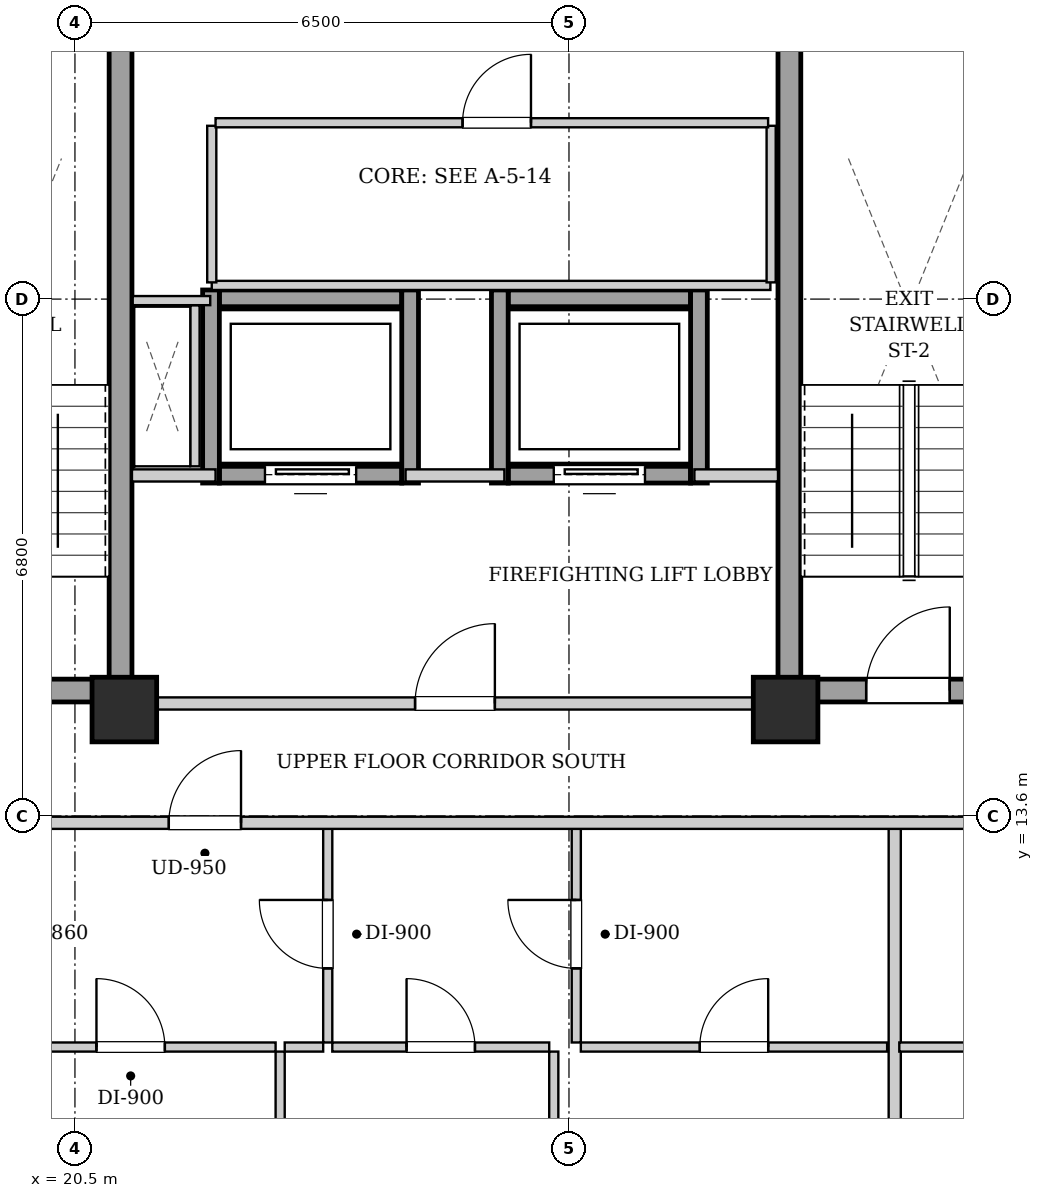
"""IFC4 building model, lengths in metres.
Left out: names, types, materials, properties, quantities, classifications, styles, units other than length and angle.
Written with IfcOpenShell. Run it as: python <this file> out.ifc"""

import sys

from ifc_helpers import new_model, si_unit, direction, frame, frame_2d, origin, origin_2d, place, context, subcontext, project, spatial, rectangle, extrude, element, fill, save


model = new_model("IFC4")
c1 = context("Model", 3, precision=1e-05, world=origin(), true_north=direction((0.0, 1.0)))
c2 = subcontext(c1, "Body", "Model", "MODEL_VIEW")
j1 = project(units=[si_unit("LENGTHUNIT", "METRE"), si_unit("PLANEANGLEUNIT", "RADIAN")], contexts=[c1])
p1 = place(None, origin())
s1 = spatial("IfcSite", under=j1, at=p1, CompositionType="ELEMENT")
p2 = place(p1, origin())
s2 = spatial("IfcBuilding", under=s1, at=p2, CompositionType="ELEMENT")
p3 = place(p2, frame((0.0, 0.0, 207.4)))
s3 = spatial("IfcBuildingStorey", under=s2, at=p3, CompositionType="ELEMENT", Elevation=207.4)
for number, where, z_axis, x_axis in (
    (1, (21.15, 15.0, 0.0), (0.0, 0.0, 1.0), (1.0, 0.0, 0.0)),
    (2, (29.85, 15.0, 0.0), (0.0, 0.0, 1.0), (1.0, 0.0, 0.0)),
):
    element("IfcColumn", number, at=place(p3, frame(where, z_axis=z_axis, x_axis=x_axis)), inside=s3, PredefinedType="COLUMN", context=c2, shape_type="SweptSolid", body=[
        extrude(rectangle(XDim=0.85, YDim=0.85, at=origin_2d()), origin(), (0.0, 0.0, 1.0), 3.3),
    ])
p4 = place(p3, frame((21.1, 15.1, 0.0), z_axis=(0.0, 0.0, 1.0), x_axis=(0.0, 1.0, 0.0)))
e3 = element("IfcWall", 3, at=p4, inside=s3, PredefinedType="SHEAR", context=c2, shape_type="SweptSolid", body=[
    extrude(rectangle(XDim=9.0, YDim=0.3, at=frame_2d((4.5, 0.0))), origin(), (0.0, 0.0, 1.0), 3.04),
])
p5 = place(p3, frame((18.1, 15.25, 0.0), z_axis=(0.0, 0.0, 1.0), x_axis=(1.0, 0.0, 0.0)))
e4 = element("IfcWall", 4, at=p5, inside=s3, PredefinedType="SHEAR", context=c2, shape_type="SweptSolid", body=[
    extrude(rectangle(XDim=2.85, YDim=0.3, at=frame_2d((1.425, 0.0))), origin(), (0.0, 0.0, 1.0), 3.04),
])
p6 = place(p5, frame((0.86, 0.0, 0.0)))
e5 = element("IfcOpeningElement", 5, at=p6, cuts=e4, PredefinedType="OPENING", context=c2, shape_type="SweptSolid", body=[
    extrude(rectangle(XDim=1.1, YDim=2.05, at=frame_2d((0.55, 1.025))), frame((0.0, 0.16, 0.0), z_axis=(0.0, -1.0, 0.0), x_axis=(1.0, 0.0, 0.0)), (0.0, 0.0, 1.0), 0.32),
])
p7 = place(p3, frame((29.9, 15.1, 0.0), z_axis=(0.0, 0.0, 1.0), x_axis=(0.0, 1.0, 0.0)))
e6 = element("IfcWall", 6, at=p7, inside=s3, PredefinedType="SHEAR", context=c2, shape_type="SweptSolid", body=[
    extrude(rectangle(XDim=9.0, YDim=0.3, at=frame_2d((4.5, 0.0))), origin(), (0.0, 0.0, 1.0), 3.04),
])
p8 = place(p3, frame((30.05, 15.25, 0.0), z_axis=(0.0, 0.0, 1.0), x_axis=(1.0, 0.0, 0.0)))
e7 = element("IfcWall", 7, at=p8, inside=s3, PredefinedType="SHEAR", context=c2, shape_type="SweptSolid", body=[
    extrude(rectangle(XDim=2.85, YDim=0.3, at=frame_2d((1.425, 0.0))), origin(), (0.0, 0.0, 1.0), 3.04),
])
p9 = place(p8, frame((0.86, 0.0, 0.0)))
e8 = element("IfcOpeningElement", 8, at=p9, cuts=e7, PredefinedType="OPENING", context=c2, shape_type="SweptSolid", body=[
    extrude(rectangle(XDim=1.1, YDim=2.05, at=frame_2d((0.55, 1.025))), frame((0.0, 0.16, 0.0), z_axis=(0.0, -1.0, 0.0), x_axis=(1.0, 0.0, 0.0)), (0.0, 0.0, 1.0), 0.32),
])
p10 = place(p3, frame((22.4, 18.09, 0.0), z_axis=(0.0, 0.0, 1.0), x_axis=(1.0, 0.0, 0.0)))
e9 = element("IfcWall", 9, at=p10, inside=s3, PredefinedType="SHEAR", context=c2, shape_type="SweptSolid", body=[
    extrude(rectangle(XDim=2.4, YDim=0.22, at=frame_2d((1.2, 0.0))), origin(), (0.0, 0.0, 1.0), 3.04),
])
p11 = place(p10, frame((0.6, 0.0, 0.0)))
e10 = element("IfcOpeningElement", 10, at=p11, cuts=e9, PredefinedType="OPENING", context=c2, shape_type="SweptSolid", body=[
    extrude(rectangle(XDim=1.2, YDim=2.15, at=frame_2d((0.6, 1.075))), frame((0.0, 0.12, 0.0), z_axis=(0.0, -1.0, 0.0), x_axis=(1.0, 0.0, 0.0)), (0.0, 0.0, 1.0), 0.24),
])
p12 = place(p3, frame((22.4, 20.41, 0.0), z_axis=(0.0, 0.0, 1.0), x_axis=(1.0, 0.0, 0.0)))
e11 = element("IfcWall", 11, at=p12, inside=s3, PredefinedType="SHEAR", context=c2, shape_type="SweptSolid", body=[
    extrude(rectangle(XDim=2.4, YDim=0.22, at=frame_2d((1.2, 0.0))), origin(), (0.0, 0.0, 1.0), 3.04),
])
for number, where, z_axis, x_axis in (
    (12, (22.29, 17.98, 0.0), (0.0, 0.0, 1.0), (0.0, 1.0, 0.0)),
    (13, (24.91, 17.98, 0.0), (0.0, 0.0, 1.0), (0.0, 1.0, 0.0)),
):
    element("IfcWall", number, at=place(p3, frame(where, z_axis=z_axis, x_axis=x_axis)), inside=s3, PredefinedType="SHEAR", context=c2, shape_type="SweptSolid", body=[
        extrude(rectangle(XDim=2.54, YDim=0.22, at=frame_2d((1.27, 0.0))), origin(), (0.0, 0.0, 1.0), 3.04),
    ])
p13 = place(p3, frame((26.2, 18.09, 0.0), z_axis=(0.0, 0.0, 1.0), x_axis=(1.0, 0.0, 0.0)))
e14 = element("IfcWall", 14, at=p13, inside=s3, PredefinedType="SHEAR", context=c2, shape_type="SweptSolid", body=[
    extrude(rectangle(XDim=2.4, YDim=0.22, at=frame_2d((1.2, 0.0))), origin(), (0.0, 0.0, 1.0), 3.04),
])
p14 = place(p13, frame((0.6, 0.0, 0.0)))
e15 = element("IfcOpeningElement", 15, at=p14, cuts=e14, PredefinedType="OPENING", context=c2, shape_type="SweptSolid", body=[
    extrude(rectangle(XDim=1.2, YDim=2.15, at=frame_2d((0.6, 1.075))), frame((0.0, 0.12, 0.0), z_axis=(0.0, -1.0, 0.0), x_axis=(1.0, 0.0, 0.0)), (0.0, 0.0, 1.0), 0.24),
])
p15 = place(p3, frame((26.2, 20.41, 0.0), z_axis=(0.0, 0.0, 1.0), x_axis=(1.0, 0.0, 0.0)))
e16 = element("IfcWall", 16, at=p15, inside=s3, PredefinedType="SHEAR", context=c2, shape_type="SweptSolid", body=[
    extrude(rectangle(XDim=2.4, YDim=0.22, at=frame_2d((1.2, 0.0))), origin(), (0.0, 0.0, 1.0), 3.04),
])
for number, where, z_axis, x_axis in (
    (17, (26.09, 17.98, 0.0), (0.0, 0.0, 1.0), (0.0, 1.0, 0.0)),
    (18, (28.71, 17.98, 0.0), (0.0, 0.0, 1.0), (0.0, 1.0, 0.0)),
):
    element("IfcWall", number, at=place(p3, frame(where, z_axis=z_axis, x_axis=x_axis)), inside=s3, PredefinedType="SHEAR", context=c2, shape_type="SweptSolid", body=[
        extrude(rectangle(XDim=2.54, YDim=0.22, at=frame_2d((1.27, 0.0))), origin(), (0.0, 0.0, 1.0), 3.04),
    ])
p16 = place(p3, frame((21.25, 15.08, 0.0), z_axis=(0.0, 0.0, 1.0), x_axis=(1.0, 0.0, 0.0)))
e19 = element("IfcWall", 19, at=p16, inside=s3, PredefinedType="PARTITIONING", context=c2, shape_type="SweptSolid", body=[
    extrude(rectangle(XDim=8.5, YDim=0.16, at=frame_2d((4.25, 0.0))), origin(), (0.0, 0.0, 1.0), 2.556),
])
p17 = place(p16, frame((3.725, 0.0, 0.0)))
e20 = element("IfcOpeningElement", 20, at=p17, cuts=e19, PredefinedType="OPENING", context=c2, shape_type="SweptSolid", body=[
    extrude(rectangle(XDim=1.05, YDim=2.05, at=frame_2d((0.525, 1.025))), frame((0.0, 0.09, 0.0), z_axis=(0.0, -1.0, 0.0), x_axis=(1.0, 0.0, 0.0)), (0.0, 0.0, 1.0), 0.18),
])
p18 = place(p3, frame((21.25, 18.08, 0.0), z_axis=(0.0, 0.0, 1.0), x_axis=(1.0, 0.0, 0.0)))
e21 = element("IfcWall", 21, at=p18, inside=s3, PredefinedType="PARTITIONING", context=c2, shape_type="SweptSolid", body=[
    extrude(rectangle(XDim=1.1, YDim=0.16, at=frame_2d((0.55, 0.0))), origin(), (0.0, 0.0, 1.0), 3.04),
])
p19 = place(p3, frame((24.85, 18.08, 0.0), z_axis=(0.0, 0.0, 1.0), x_axis=(1.0, 0.0, 0.0)))
e22 = element("IfcWall", 22, at=p19, inside=s3, PredefinedType="PARTITIONING", context=c2, shape_type="SweptSolid", body=[
    extrude(rectangle(XDim=1.3, YDim=0.16, at=frame_2d((0.65, 0.0))), origin(), (0.0, 0.0, 1.0), 3.04),
])
p20 = place(p3, frame((28.65, 18.08, 0.0), z_axis=(0.0, 0.0, 1.0), x_axis=(1.0, 0.0, 0.0)))
e23 = element("IfcWall", 23, at=p20, inside=s3, PredefinedType="PARTITIONING", context=c2, shape_type="SweptSolid", body=[
    extrude(rectangle(XDim=1.1, YDim=0.16, at=frame_2d((0.55, 0.0))), origin(), (0.0, 0.0, 1.0), 3.04),
])
p21 = place(p3, frame((22.08, 18.2, 0.0), z_axis=(0.0, 0.0, 1.0), x_axis=(0.0, 1.0, 0.0)))
e24 = element("IfcWall", 24, at=p21, inside=s3, PredefinedType="PARTITIONING", context=c2, shape_type="SweptSolid", body=[
    extrude(rectangle(XDim=2.12, YDim=0.12, at=frame_2d((1.06, 0.0))), origin(), (0.0, 0.0, 1.0), 3.04),
])
p22 = place(p3, frame((22.28, 20.38, 0.0), z_axis=(0.0, 0.0, 1.0), x_axis=(-1.0, 0.0, 0.0)))
e25 = element("IfcWall", 25, at=p22, inside=s3, PredefinedType="PARTITIONING", context=c2, shape_type="SweptSolid", body=[
    extrude(rectangle(XDim=1.02, YDim=0.12, at=frame_2d((0.51, 0.0))), origin(), (0.0, 0.0, 1.0), 3.04),
])
p23 = place(p3, frame((22.3, 20.58, 0.0), z_axis=(0.0, 0.0, 1.0), x_axis=(1.0, 0.0, 0.0)))
e26 = element("IfcWall", 26, at=p23, inside=s3, PredefinedType="PARTITIONING", context=c2, shape_type="SweptSolid", body=[
    extrude(rectangle(XDim=7.35, YDim=0.12, at=frame_2d((3.675, 0.0))), origin(), (0.0, 0.0, 1.0), 3.04),
])
for number, where, z_axis, x_axis in (
    (27, (22.3, 20.62, 0.0), (0.0, 0.0, 1.0), (0.0, 1.0, 0.0)),
    (28, (29.66, 20.62, 0.0), (0.0, 0.0, 1.0), (0.0, 1.0, 0.0)),
):
    element("IfcWall", number, at=place(p3, frame(where, z_axis=z_axis, x_axis=x_axis)), inside=s3, PredefinedType="PARTITIONING", context=c2, shape_type="SweptSolid", body=[
        extrude(rectangle(XDim=2.06, YDim=0.12, at=frame_2d((1.03, 0.0))), origin(), (0.0, 0.0, 1.0), 3.04),
    ])
p24 = place(p3, frame((22.35, 22.72, 0.0), z_axis=(0.0, 0.0, 1.0), x_axis=(1.0, 0.0, 0.0)))
e29 = element("IfcWall", 29, at=p24, inside=s3, PredefinedType="PARTITIONING", context=c2, shape_type="SweptSolid", body=[
    extrude(rectangle(XDim=7.27, YDim=0.12, at=frame_2d((3.635, 0.0))), origin(), (0.0, 0.0, 1.0), 3.04),
])
p25 = place(p24, frame((3.25, 0.0, 0.0)))
e30 = element("IfcOpeningElement", 30, at=p25, cuts=e29, PredefinedType="OPENING", context=c2, shape_type="SweptSolid", body=[
    extrude(rectangle(XDim=0.9, YDim=2.05, at=frame_2d((0.45, 1.025))), frame((0.0, 0.07, 0.0), z_axis=(0.0, -1.0, 0.0), x_axis=(1.0, 0.0, 0.0)), (0.0, 0.0, 1.0), 0.14),
])
p26 = place(p3, frame((23.826, 10.62, 0.0), z_axis=(0.0, 0.0, 1.0), x_axis=(0.0, 1.0, 0.0)))
e31 = element("IfcWall", 31, at=p26, inside=s3, PredefinedType="PARTITIONING", context=c2, shape_type="SweptSolid", body=[
    extrude(rectangle(XDim=2.85, YDim=0.12, at=frame_2d((1.425, 0.0))), origin(), (0.0, 0.0, 1.0), 3.04),
])
p27 = place(p26, frame((0.975, 0.0, 0.0)))
e32 = element("IfcOpeningElement", 32, at=p27, cuts=e31, PredefinedType="OPENING", context=c2, shape_type="SweptSolid", body=[
    extrude(rectangle(XDim=0.9, YDim=2.05, at=frame_2d((0.45, 1.025))), frame((0.0, 0.07, 0.0), z_axis=(0.0, -1.0, 0.0), x_axis=(1.0, 0.0, 0.0)), (0.0, 0.0, 1.0), 0.14),
])
p28 = place(p3, frame((19.326, 10.56, 0.0), z_axis=(0.0, 0.0, 1.0), x_axis=(1.0, 0.0, 0.0)))
e33 = element("IfcWall", 33, at=p28, inside=s3, PredefinedType="PARTITIONING", context=c2, shape_type="SweptSolid", body=[
    extrude(rectangle(XDim=3.814, YDim=0.12, at=frame_2d((1.907, 0.0))), origin(), (0.0, 0.0, 1.0), 3.04),
])
p29 = place(p28, frame((1.457, 0.0, 0.0)))
e34 = element("IfcOpeningElement", 34, at=p29, cuts=e33, PredefinedType="OPENING", context=c2, shape_type="SweptSolid", body=[
    extrude(rectangle(XDim=0.9, YDim=2.05, at=frame_2d((0.45, 1.025))), frame((0.0, 0.07, 0.0), z_axis=(0.0, -1.0, 0.0), x_axis=(1.0, 0.0, 0.0)), (0.0, 0.0, 1.0), 0.14),
])
p30 = place(p3, frame((23.26, 10.56, 0.0), z_axis=(0.0, 0.0, 1.0), x_axis=(1.0, 0.0, 0.0)))
e35 = element("IfcWall", 35, at=p30, inside=s3, PredefinedType="PARTITIONING", context=c2, shape_type="SweptSolid", body=[
    extrude(rectangle(XDim=0.506, YDim=0.12, at=frame_2d((0.253, 0.0))), origin(), (0.0, 0.0, 1.0), 3.04),
])
p31 = place(p3, frame((27.096, 10.62, 0.0), z_axis=(0.0, 0.0, 1.0), x_axis=(0.0, 1.0, 0.0)))
e36 = element("IfcWall", 36, at=p31, inside=s3, PredefinedType="PARTITIONING", context=c2, shape_type="SweptSolid", body=[
    extrude(rectangle(XDim=2.85, YDim=0.12, at=frame_2d((1.425, 0.0))), origin(), (0.0, 0.0, 1.0), 3.04),
])
p32 = place(p31, frame((0.975, 0.0, 0.0)))
e37 = element("IfcOpeningElement", 37, at=p32, cuts=e36, PredefinedType="OPENING", context=c2, shape_type="SweptSolid", body=[
    extrude(rectangle(XDim=0.9, YDim=2.05, at=frame_2d((0.45, 1.025))), frame((0.0, 0.07, 0.0), z_axis=(0.0, -1.0, 0.0), x_axis=(1.0, 0.0, 0.0)), (0.0, 0.0, 1.0), 0.14),
])
p33 = place(p3, frame((23.886, 10.56, 0.0), z_axis=(0.0, 0.0, 1.0), x_axis=(1.0, 0.0, 0.0)))
e38 = element("IfcWall", 38, at=p33, inside=s3, PredefinedType="PARTITIONING", context=c2, shape_type="SweptSolid", body=[
    extrude(rectangle(XDim=2.854, YDim=0.12, at=frame_2d((1.427, 0.0))), origin(), (0.0, 0.0, 1.0), 3.04),
])
p34 = place(p33, frame((0.977, 0.0, 0.0)))
e39 = element("IfcOpeningElement", 39, at=p34, cuts=e38, PredefinedType="OPENING", context=c2, shape_type="SweptSolid", body=[
    extrude(rectangle(XDim=0.9, YDim=2.05, at=frame_2d((0.45, 1.025))), frame((0.0, 0.07, 0.0), z_axis=(0.0, -1.0, 0.0), x_axis=(1.0, 0.0, 0.0)), (0.0, 0.0, 1.0), 0.14),
])
p35 = place(p3, frame((27.156, 10.56, 0.0), z_axis=(0.0, 0.0, 1.0), x_axis=(1.0, 0.0, 0.0)))
e40 = element("IfcWall", 40, at=p35, inside=s3, PredefinedType="PARTITIONING", context=c2, shape_type="SweptSolid", body=[
    extrude(rectangle(XDim=4.03, YDim=0.12, at=frame_2d((2.015, 0.0))), origin(), (0.0, 0.0, 1.0), 3.04),
])
p36 = place(p35, frame((1.565, 0.0, 0.0)))
e41 = element("IfcOpeningElement", 41, at=p36, cuts=e40, PredefinedType="OPENING", context=c2, shape_type="SweptSolid", body=[
    extrude(rectangle(XDim=0.9, YDim=2.05, at=frame_2d((0.45, 1.025))), frame((0.0, 0.07, 0.0), z_axis=(0.0, -1.0, 0.0), x_axis=(1.0, 0.0, 0.0)), (0.0, 0.0, 1.0), 0.14),
])
p37 = place(p3, frame((23.2, 4.08, 0.0), z_axis=(0.0, 0.0, 1.0), x_axis=(0.0, 1.0, 0.0)))
e42 = element("IfcWall", 42, at=p37, inside=s3, PredefinedType="PARTITIONING", context=c2, shape_type="SweptSolid", body=[
    extrude(rectangle(XDim=6.42, YDim=0.12, at=frame_2d((3.21, 0.0))), origin(), (0.0, 0.0, 1.0), 3.04),
])
p38 = place(p37, frame((2.745, 0.0, 0.0)))
e43 = element("IfcOpeningElement", 43, at=p38, cuts=e42, PredefinedType="OPENING", context=c2, shape_type="SweptSolid", body=[
    extrude(rectangle(XDim=0.9, YDim=2.05, at=frame_2d((0.45, 1.025))), frame((0.0, 0.07, 0.0), z_axis=(0.0, -1.0, 0.0), x_axis=(1.0, 0.0, 0.0)), (0.0, 0.0, 1.0), 0.14),
])
p39 = place(p3, frame((26.8, 4.08, 0.0), z_axis=(0.0, 0.0, 1.0), x_axis=(0.0, 1.0, 0.0)))
e44 = element("IfcWall", 44, at=p39, inside=s3, PredefinedType="PARTITIONING", context=c2, shape_type="SweptSolid", body=[
    extrude(rectangle(XDim=6.42, YDim=0.12, at=frame_2d((3.21, 0.0))), origin(), (0.0, 0.0, 1.0), 3.04),
])
p40 = place(p39, frame((2.745, 0.0, 0.0)))
e45 = element("IfcOpeningElement", 45, at=p40, cuts=e44, PredefinedType="OPENING", context=c2, shape_type="SweptSolid", body=[
    extrude(rectangle(XDim=0.9, YDim=2.05, at=frame_2d((0.45, 1.025))), frame((0.0, 0.07, 0.0), z_axis=(0.0, -1.0, 0.0), x_axis=(1.0, 0.0, 0.0)), (0.0, 0.0, 1.0), 0.14),
])
p41 = place(p3, frame((31.286, 4.08, 0.0), z_axis=(0.0, 0.0, 1.0), x_axis=(0.0, 1.0, 0.0)))
e46 = element("IfcWall", 46, at=p41, inside=s3, PredefinedType="PARTITIONING", context=c2, shape_type="SweptSolid", body=[
    extrude(rectangle(XDim=9.39, YDim=0.16, at=frame_2d((4.695, 0.0))), origin(), (0.0, 0.0, 1.0), 3.04),
])
p42 = place(p3, frame((31.346, 10.56, 0.0), z_axis=(0.0, 0.0, 1.0), x_axis=(1.0, 0.0, 0.0)))
e47 = element("IfcWall", 47, at=p42, inside=s3, PredefinedType="PARTITIONING", context=c2, shape_type="SweptSolid", body=[
    extrude(rectangle(XDim=1.912, YDim=0.12, at=frame_2d((0.956, 0.0))), origin(), (0.0, 0.0, 1.0), 3.04),
])
p43 = place(p3, frame((13.15, 13.51, 0.0), z_axis=(0.0, 0.0, 1.0), x_axis=(1.0, 0.0, 0.0)))
e48 = element("IfcWall", 48, at=p43, inside=s3, PredefinedType="PARTITIONING", context=c2, shape_type="SweptSolid", body=[
    extrude(rectangle(XDim=24.6, YDim=0.16, at=frame_2d((12.3, 0.0))), origin(), (0.0, 0.0, 1.0), 3.04),
])
p44 = place(p43, frame((1.323, 0.0, 0.0)))
e49 = element("IfcOpeningElement", 49, at=p44, cuts=e48, PredefinedType="OPENING", context=c2, shape_type="SweptSolid", body=[
    extrude(rectangle(XDim=0.95, YDim=2.1, at=frame_2d((0.475, 1.05))), frame((0.0, 0.09, 0.0), z_axis=(0.0, -1.0, 0.0), x_axis=(1.0, 0.0, 0.0)), (0.0, 0.0, 1.0), 0.18),
])
p45 = place(p43, frame((8.585, 0.0, 0.0)))
e50 = element("IfcOpeningElement", 50, at=p45, cuts=e48, PredefinedType="OPENING", context=c2, shape_type="SweptSolid", body=[
    extrude(rectangle(XDim=0.95, YDim=2.1, at=frame_2d((0.475, 1.05))), frame((0.0, 0.09, 0.0), z_axis=(0.0, -1.0, 0.0), x_axis=(1.0, 0.0, 0.0)), (0.0, 0.0, 1.0), 0.18),
])
p46 = place(p43, frame((21.889, 0.0, 0.0)))
e51 = element("IfcOpeningElement", 51, at=p46, cuts=e48, PredefinedType="OPENING", context=c2, shape_type="SweptSolid", body=[
    extrude(rectangle(XDim=0.95, YDim=2.1, at=frame_2d((0.475, 1.05))), frame((0.0, 0.09, 0.0), z_axis=(0.0, -1.0, 0.0), x_axis=(1.0, 0.0, 0.0)), (0.0, 0.0, 1.0), 0.18),
])
p47 = place(p9, origin())
e52 = element("IfcDoor", 52, at=p47, inside=s3, OperationType="SINGLE_SWING_RIGHT", PredefinedType="DOOR", context=c2, shape_type="SweptSolid", body=[
    extrude(rectangle(XDim=1.1, YDim=2.05, at=frame_2d((0.55, 1.025))), frame((0.0, 0.025, 0.0), z_axis=(0.0, -1.0, 0.0), x_axis=(1.0, 0.0, 0.0)), (0.0, 0.0, 1.0), 0.05),
])
fill(e8, e52)
p48 = place(p11, origin())
e53 = element("IfcDoor", 53, at=p48, inside=s3, OperationType="SLIDING_TO_LEFT", PredefinedType="DOOR", context=c2, shape_type="SweptSolid", body=[
    extrude(rectangle(XDim=1.2, YDim=2.15, at=frame_2d((0.6, 1.075))), frame((0.0, 0.025, 0.0), z_axis=(0.0, -1.0, 0.0), x_axis=(1.0, 0.0, 0.0)), (0.0, 0.0, 1.0), 0.05),
])
fill(e10, e53)
p49 = place(p14, origin())
e54 = element("IfcDoor", 54, at=p49, inside=s3, OperationType="SLIDING_TO_LEFT", PredefinedType="DOOR", context=c2, shape_type="SweptSolid", body=[
    extrude(rectangle(XDim=1.2, YDim=2.15, at=frame_2d((0.6, 1.075))), frame((0.0, 0.025, 0.0), z_axis=(0.0, -1.0, 0.0), x_axis=(1.0, 0.0, 0.0)), (0.0, 0.0, 1.0), 0.05),
])
fill(e15, e54)
p50 = place(p17, origin())
e55 = element("IfcDoor", 55, at=p50, inside=s3, OperationType="SINGLE_SWING_RIGHT", PredefinedType="DOOR", context=c2, shape_type="SweptSolid", body=[
    extrude(rectangle(XDim=1.05, YDim=2.05, at=frame_2d((0.525, 1.025))), frame((0.0, 0.025, 0.0), z_axis=(0.0, -1.0, 0.0), x_axis=(1.0, 0.0, 0.0)), (0.0, 0.0, 1.0), 0.05),
])
fill(e20, e55)
p51 = place(p25, origin())
e56 = element("IfcDoor", 56, at=p51, inside=s3, OperationType="SINGLE_SWING_RIGHT", PredefinedType="DOOR", context=c2, shape_type="SweptSolid", body=[
    extrude(rectangle(XDim=0.9, YDim=2.05, at=frame_2d((0.45, 1.025))), frame((0.0, 0.025, 0.0), z_axis=(0.0, -1.0, 0.0), x_axis=(1.0, 0.0, 0.0)), (0.0, 0.0, 1.0), 0.05),
])
fill(e30, e56)
p52 = place(p27, origin())
e57 = element("IfcDoor", 57, at=p52, inside=s3, OperationType="SINGLE_SWING_RIGHT", PredefinedType="DOOR", context=c2, shape_type="SweptSolid", body=[
    extrude(rectangle(XDim=0.9, YDim=2.05, at=frame_2d((0.45, 1.025))), frame((0.0, 0.025, 0.0), z_axis=(0.0, -1.0, 0.0), x_axis=(1.0, 0.0, 0.0)), (0.0, 0.0, 1.0), 0.05),
])
fill(e32, e57)
p53 = place(p29, origin())
e58 = element("IfcDoor", 58, at=p53, inside=s3, OperationType="SINGLE_SWING_LEFT", PredefinedType="DOOR", context=c2, shape_type="SweptSolid", body=[
    extrude(rectangle(XDim=0.9, YDim=2.05, at=frame_2d((0.45, 1.025))), frame((0.0, 0.025, 0.0), z_axis=(0.0, -1.0, 0.0), x_axis=(1.0, 0.0, 0.0)), (0.0, 0.0, 1.0), 0.05),
])
fill(e34, e58)
p54 = place(p32, origin())
e59 = element("IfcDoor", 59, at=p54, inside=s3, OperationType="SINGLE_SWING_RIGHT", PredefinedType="DOOR", context=c2, shape_type="SweptSolid", body=[
    extrude(rectangle(XDim=0.9, YDim=2.05, at=frame_2d((0.45, 1.025))), frame((0.0, 0.025, 0.0), z_axis=(0.0, -1.0, 0.0), x_axis=(1.0, 0.0, 0.0)), (0.0, 0.0, 1.0), 0.05),
])
fill(e37, e59)
p55 = place(p34, origin())
e60 = element("IfcDoor", 60, at=p55, inside=s3, OperationType="SINGLE_SWING_LEFT", PredefinedType="DOOR", context=c2, shape_type="SweptSolid", body=[
    extrude(rectangle(XDim=0.9, YDim=2.05, at=frame_2d((0.45, 1.025))), frame((0.0, 0.025, 0.0), z_axis=(0.0, -1.0, 0.0), x_axis=(1.0, 0.0, 0.0)), (0.0, 0.0, 1.0), 0.05),
])
fill(e39, e60)
p56 = place(p36, origin())
e61 = element("IfcDoor", 61, at=p56, inside=s3, OperationType="SINGLE_SWING_RIGHT", PredefinedType="DOOR", context=c2, shape_type="SweptSolid", body=[
    extrude(rectangle(XDim=0.9, YDim=2.05, at=frame_2d((0.45, 1.025))), frame((0.0, 0.025, 0.0), z_axis=(0.0, -1.0, 0.0), x_axis=(1.0, 0.0, 0.0)), (0.0, 0.0, 1.0), 0.05),
])
fill(e41, e61)
p57 = place(p45, origin())
e62 = element("IfcDoor", 62, at=p57, inside=s3, OperationType="SINGLE_SWING_RIGHT", PredefinedType="DOOR", context=c2, shape_type="SweptSolid", body=[
    extrude(rectangle(XDim=0.95, YDim=2.1, at=frame_2d((0.475, 1.05))), frame((0.0, 0.025, 0.0), z_axis=(0.0, -1.0, 0.0), x_axis=(1.0, 0.0, 0.0)), (0.0, 0.0, 1.0), 0.05),
])
fill(e50, e62)
save(model, sys.argv[1])
